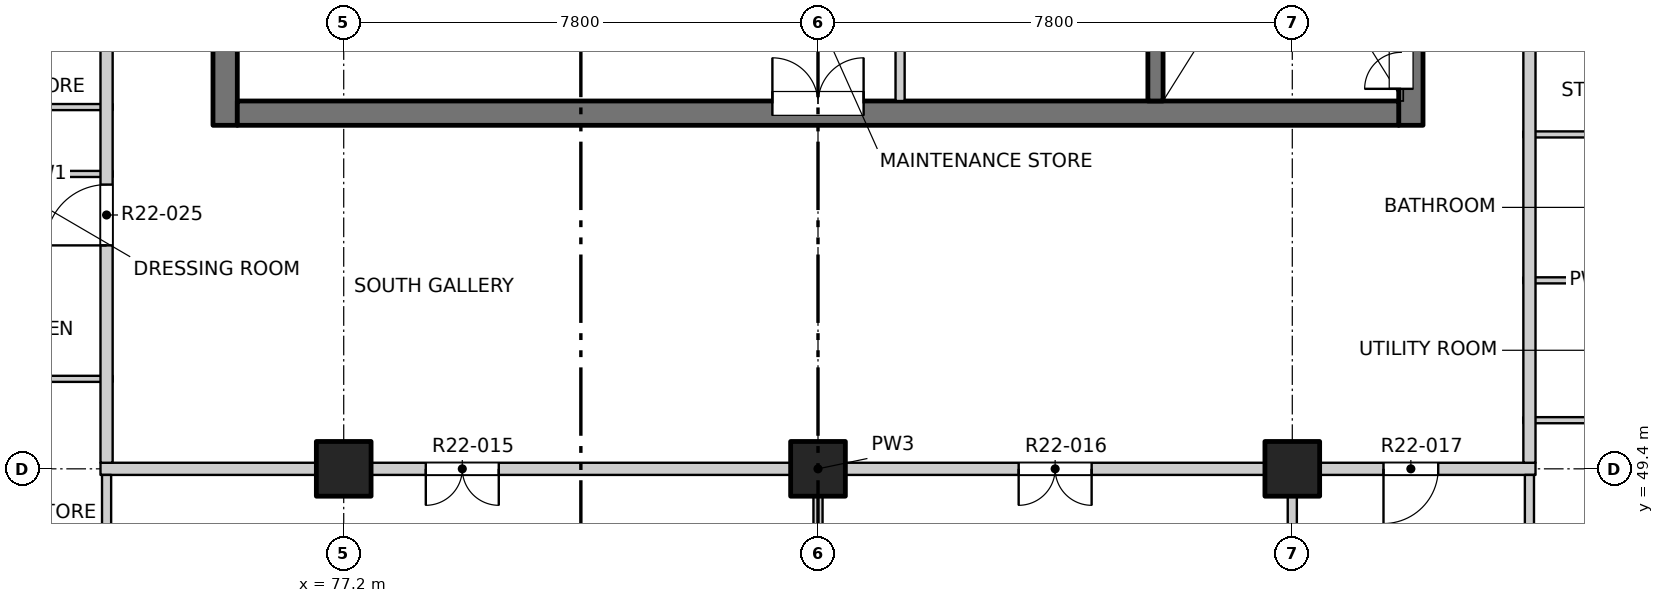
"""IFC4 building model, lengths in metres.
Left out: names, types, materials, properties, quantities, classifications, styles, units other than length and angle.
Written with IfcOpenShell. Run it as: python <this file> out.ifc"""

import sys

from ifc_helpers import new_model, si_unit, direction, frame, frame_2d, origin, origin_2d, place, context, subcontext, project, spatial, rectangle, extrude, element, fill, save


model = new_model("IFC4")
c1 = context("Model", 3, precision=1e-05, world=origin(), true_north=direction((0.0, 1.0)))
c2 = subcontext(c1, "Body", "Model", "MODEL_VIEW")
j1 = project(units=[si_unit("LENGTHUNIT", "METRE"), si_unit("PLANEANGLEUNIT", "RADIAN")], contexts=[c1])
p1 = place(None, origin())
s1 = spatial("IfcSite", under=j1, at=p1, CompositionType="ELEMENT")
p2 = place(p1, origin())
s2 = spatial("IfcBuilding", under=s1, at=p2, CompositionType="ELEMENT")
p3 = place(p2, frame((0.0, 0.0, 231.3)))
s3 = spatial("IfcBuildingStorey", under=s2, at=p3, CompositionType="ELEMENT", Elevation=231.3)
for number, where, z_axis, x_axis in (
    (1, (77.2, 49.4, -0.25), (0.0, 0.0, 1.0), (1.0, 0.0, 0.0)),
    (2, (85.0, 49.4, -0.25), (0.0, 0.0, 1.0), (1.0, 0.0, 0.0)),
    (3, (92.8, 49.4, -0.25), (0.0, 0.0, 1.0), (1.0, 0.0, 0.0)),
):
    element("IfcColumn", number, at=place(p3, frame(where, z_axis=z_axis, x_axis=x_axis)), inside=s3, PredefinedType="COLUMN", context=c2, shape_type="SweptSolid", body=[
        extrude(rectangle(XDim=0.9, YDim=0.9, at=origin_2d()), origin(), (0.0, 0.0, 1.0), 3.4),
    ])
p4 = place(p3, frame((75.25, 55.05, -0.25), z_axis=(0.0, 0.0, 1.0), x_axis=(0.0, 1.0, 0.0)))
e4 = element("IfcWall", 4, at=p4, inside=s3, PredefinedType="SOLIDWALL", context=c2, shape_type="SweptSolid", body=[
    extrude(rectangle(XDim=22.25, YDim=0.4, at=frame_2d((11.125, 0.0))), origin(), (0.0, 0.0, 1.0), 3.4),
])
p5 = place(p4, frame((7.4, 0.0, 0.25)))
e5 = element("IfcOpeningElement", 5, at=p5, cuts=e4, PredefinedType="OPENING", context=c2, shape_type="SweptSolid", body=[
    extrude(rectangle(XDim=0.9, YDim=2.1, at=frame_2d((0.45, 1.05))), frame((0.0, 0.21, 0.0), z_axis=(0.0, -1.0, 0.0), x_axis=(1.0, 0.0, 0.0)), (0.0, 0.0, 1.0), 0.42),
])
p6 = place(p4, frame((10.7, 0.0, 0.25)))
e6 = element("IfcOpeningElement", 6, at=p6, cuts=e4, PredefinedType="OPENING", context=c2, shape_type="SweptSolid", body=[
    extrude(rectangle(XDim=0.9, YDim=2.1, at=frame_2d((0.45, 1.05))), frame((0.0, 0.21, 0.0), z_axis=(0.0, -1.0, 0.0), x_axis=(1.0, 0.0, 0.0)), (0.0, 0.0, 1.0), 0.42),
])
p7 = place(p4, frame((15.2, 0.0, 0.25)))
e7 = element("IfcOpeningElement", 7, at=p7, cuts=e4, PredefinedType="OPENING", context=c2, shape_type="SweptSolid", body=[
    extrude(rectangle(XDim=0.9, YDim=2.1, at=frame_2d((0.45, 1.05))), frame((0.0, 0.21, 0.0), z_axis=(0.0, -1.0, 0.0), x_axis=(1.0, 0.0, 0.0)), (0.0, 0.0, 1.0), 0.42),
])
p8 = place(p4, frame((20.0, 0.0, 0.25)))
e8 = element("IfcOpeningElement", 8, at=p8, cuts=e4, PredefinedType="OPENING", context=c2, shape_type="SweptSolid", body=[
    extrude(rectangle(XDim=0.9, YDim=2.1, at=frame_2d((0.45, 1.05))), frame((0.0, 0.21, 0.0), z_axis=(0.0, -1.0, 0.0), x_axis=(1.0, 0.0, 0.0)), (0.0, 0.0, 1.0), 0.42),
])
p9 = place(p3, frame((94.75, 55.05, -0.25), z_axis=(0.0, 0.0, 1.0), x_axis=(0.0, 1.0, 0.0)))
e9 = element("IfcWall", 9, at=p9, inside=s3, PredefinedType="SOLIDWALL", context=c2, shape_type="SweptSolid", body=[
    extrude(rectangle(XDim=6.9, YDim=0.4, at=frame_2d((3.45, 0.0))), origin(), (0.0, 0.0, 1.0), 3.4),
])
p10 = place(p9, frame((0.6, 0.0, 0.25)))
e10 = element("IfcOpeningElement", 10, at=p10, cuts=e9, PredefinedType="OPENING", context=c2, shape_type="SweptSolid", body=[
    extrude(rectangle(XDim=1.2, YDim=2.1, at=frame_2d((0.6, 1.05))), frame((0.0, 0.21, 0.0), z_axis=(0.0, -1.0, 0.0), x_axis=(1.0, 0.0, 0.0)), (0.0, 0.0, 1.0), 0.42),
])
p11 = place(p3, frame((75.45, 55.25, -0.25), z_axis=(0.0, 0.0, 1.0), x_axis=(1.0, 0.0, 0.0)))
e11 = element("IfcWall", 11, at=p11, inside=s3, PredefinedType="SOLIDWALL", context=c2, shape_type="SweptSolid", body=[
    extrude(rectangle(XDim=19.1, YDim=0.4, at=frame_2d((9.55, 0.0))), origin(), (0.0, 0.0, 1.0), 3.4),
])
p12 = place(p11, frame((8.8, 0.0, 0.25)))
e12 = element("IfcOpeningElement", 12, at=p12, cuts=e11, PredefinedType="OPENING", context=c2, shape_type="SweptSolid", body=[
    extrude(rectangle(XDim=1.5, YDim=2.1, at=frame_2d((0.75, 1.05))), frame((0.0, 0.21, 0.0), z_axis=(0.0, -1.0, 0.0), x_axis=(1.0, 0.0, 0.0)), (0.0, 0.0, 1.0), 0.42),
])
p13 = place(p3, frame((90.55, 55.45, -0.25), z_axis=(0.0, 0.0, 1.0), x_axis=(0.0, 1.0, 0.0)))
e13 = element("IfcWall", 13, at=p13, inside=s3, PredefinedType="SOLIDWALL", context=c2, shape_type="SweptSolid", body=[
    extrude(rectangle(XDim=6.5, YDim=0.25, at=frame_2d((3.25, 0.0))), origin(), (0.0, 0.0, 1.0), 3.4),
])
p14 = place(p3, frame((73.2, 49.4, 0.0), z_axis=(0.0, 0.0, 1.0), x_axis=(1.0, 0.0, 0.0)))
e14 = element("IfcWall", 14, at=p14, inside=s3, PredefinedType="PARTITIONING", context=c2, shape_type="SweptSolid", body=[
    extrude(rectangle(XDim=23.6, YDim=0.2, at=frame_2d((11.8, 0.0))), origin(), (0.0, 0.0, 1.0), 3.15),
])
p15 = place(p14, frame((5.35, 0.0, 0.0)))
e15 = element("IfcOpeningElement", 15, at=p15, cuts=e14, PredefinedType="OPENING", context=c2, shape_type="SweptSolid", body=[
    extrude(rectangle(XDim=1.2, YDim=2.1, at=frame_2d((0.6, 1.05))), frame((0.0, 0.11, 0.0), z_axis=(0.0, -1.0, 0.0), x_axis=(1.0, 0.0, 0.0)), (0.0, 0.0, 1.0), 0.22),
])
p16 = place(p14, frame((15.1, 0.0, 0.0)))
e16 = element("IfcOpeningElement", 16, at=p16, cuts=e14, PredefinedType="OPENING", context=c2, shape_type="SweptSolid", body=[
    extrude(rectangle(XDim=1.2, YDim=2.1, at=frame_2d((0.6, 1.05))), frame((0.0, 0.11, 0.0), z_axis=(0.0, -1.0, 0.0), x_axis=(1.0, 0.0, 0.0)), (0.0, 0.0, 1.0), 0.22),
])
p17 = place(p14, frame((21.1, 0.0, 0.0)))
e17 = element("IfcOpeningElement", 17, at=p17, cuts=e14, PredefinedType="OPENING", context=c2, shape_type="SweptSolid", body=[
    extrude(rectangle(XDim=0.9, YDim=2.1, at=frame_2d((0.45, 1.05))), frame((0.0, 0.11, 0.0), z_axis=(0.0, -1.0, 0.0), x_axis=(1.0, 0.0, 0.0)), (0.0, 0.0, 1.0), 0.22),
])
for number, where, z_axis, x_axis in (
    (18, (96.6, 50.2, 0.0), (0.0, 0.0, 1.0), (1.0, 0.0, 0.0)),
    (19, (71.18, 50.88, 0.0), (0.0, 0.0, 1.0), (1.0, 0.0, 0.0)),
    (20, (96.6, 52.5, 0.0), (0.0, 0.0, 1.0), (1.0, 0.0, 0.0)),
    (21, (71.18, 54.25, 0.0), (0.0, 0.0, 1.0), (1.0, 0.0, 0.0)),
    (22, (96.6, 54.9, 0.0), (0.0, 0.0, 1.0), (1.0, 0.0, 0.0)),
    (23, (71.18, 55.35, 0.0), (0.0, 0.0, 1.0), (1.0, 0.0, 0.0)),
):
    element("IfcWall", number, at=place(p3, frame(where, z_axis=z_axis, x_axis=x_axis)), inside=s3, PredefinedType="PARTITIONING", context=c2, shape_type="SweptSolid", body=[
        extrude(rectangle(XDim=2.22, YDim=0.1, at=frame_2d((1.11, 0.0))), origin(), (0.0, 0.0, 1.0), 3.15),
    ])
p18 = place(p3, frame((73.3, 41.9, 0.0), z_axis=(0.0, 0.0, 1.0), x_axis=(0.0, 1.0, 0.0)))
e24 = element("IfcWall", 24, at=p18, inside=s3, PredefinedType="PARTITIONING", context=c2, shape_type="SweptSolid", body=[
    extrude(rectangle(XDim=7.4, YDim=0.15, at=frame_2d((3.7, 0.0))), origin(), (0.0, 0.0, 1.0), 3.15),
])
p19 = place(p3, frame((73.3, 49.5, 0.0), z_axis=(0.0, 0.0, 1.0), x_axis=(0.0, 1.0, 0.0)))
e25 = element("IfcWall", 25, at=p19, inside=s3, PredefinedType="PARTITIONING", context=c2, shape_type="SweptSolid", body=[
    extrude(rectangle(XDim=34.9, YDim=0.2, at=frame_2d((17.45, 0.0))), origin(), (0.0, 0.0, 1.0), 3.15),
])
p20 = place(p19, frame((3.575, 0.0, 0.0)))
e26 = element("IfcOpeningElement", 26, at=p20, cuts=e25, PredefinedType="OPENING", context=c2, shape_type="SweptSolid", body=[
    extrude(rectangle(XDim=1.0, YDim=2.1, at=frame_2d((0.5, 1.05))), frame((0.0, 0.11, 0.0), z_axis=(0.0, -1.0, 0.0), x_axis=(1.0, 0.0, 0.0)), (0.0, 0.0, 1.0), 0.22),
])
p21 = place(p19, frame((18.075, 0.0, 0.0)))
e27 = element("IfcOpeningElement", 27, at=p21, cuts=e25, PredefinedType="OPENING", context=c2, shape_type="SweptSolid", body=[
    extrude(rectangle(XDim=1.0, YDim=2.1, at=frame_2d((0.5, 1.05))), frame((0.0, 0.11, 0.0), z_axis=(0.0, -1.0, 0.0), x_axis=(1.0, 0.0, 0.0)), (0.0, 0.0, 1.0), 0.22),
])
p22 = place(p19, frame((26.175, 0.0, 0.0)))
e28 = element("IfcOpeningElement", 28, at=p22, cuts=e25, PredefinedType="OPENING", context=c2, shape_type="SweptSolid", body=[
    extrude(rectangle(XDim=1.0, YDim=2.1, at=frame_2d((0.5, 1.05))), frame((0.0, 0.11, 0.0), z_axis=(0.0, -1.0, 0.0), x_axis=(1.0, 0.0, 0.0)), (0.0, 0.0, 1.0), 0.22),
])
p23 = place(p3, frame((85.0, 41.9, 0.0), z_axis=(0.0, 0.0, 1.0), x_axis=(0.0, 1.0, 0.0)))
e29 = element("IfcWall", 29, at=p23, inside=s3, PredefinedType="PARTITIONING", context=c2, shape_type="SweptSolid", body=[
    extrude(rectangle(XDim=7.4, YDim=0.15, at=frame_2d((3.7, 0.0))), origin(), (0.0, 0.0, 1.0), 3.15),
])
p24 = place(p3, frame((86.35, 55.45, 0.0), z_axis=(0.0, 0.0, 1.0), x_axis=(0.0, 1.0, 0.0)))
e30 = element("IfcWall", 30, at=p24, inside=s3, PredefinedType="PARTITIONING", context=c2, shape_type="SweptSolid", body=[
    extrude(rectangle(XDim=5.575, YDim=0.15, at=frame_2d((2.788, 0.0))), origin(), (0.0, 0.0, 1.0), 3.15),
])
p25 = place(p24, frame((2.25, 0.0, 0.0)))
e31 = element("IfcOpeningElement", 31, at=p25, cuts=e30, PredefinedType="OPENING", context=c2, shape_type="SweptSolid", body=[
    extrude(rectangle(XDim=0.9, YDim=2.1, at=frame_2d((0.45, 1.05))), frame((0.0, 0.085, 0.0), z_axis=(0.0, -1.0, 0.0), x_axis=(1.0, 0.0, 0.0)), (0.0, 0.0, 1.0), 0.17),
])
for number, where, z_axis, x_axis in (
    (32, (92.8, 41.9, 0.0), (0.0, 0.0, 1.0), (0.0, 1.0, 0.0)),
    (33, (96.7, 41.9, 0.0), (0.0, 0.0, 1.0), (0.0, 1.0, 0.0)),
):
    element("IfcWall", number, at=place(p3, frame(where, z_axis=z_axis, x_axis=x_axis)), inside=s3, PredefinedType="PARTITIONING", context=c2, shape_type="SweptSolid", body=[
        extrude(rectangle(XDim=7.4, YDim=0.15, at=frame_2d((3.7, 0.0))), origin(), (0.0, 0.0, 1.0), 3.15),
    ])
p26 = place(p3, frame((96.7, 49.5, 0.0), z_axis=(0.0, 0.0, 1.0), x_axis=(0.0, 1.0, 0.0)))
e34 = element("IfcWall", 34, at=p26, inside=s3, PredefinedType="PARTITIONING", context=c2, shape_type="SweptSolid", body=[
    extrude(rectangle(XDim=34.9, YDim=0.2, at=frame_2d((17.45, 0.0))), origin(), (0.0, 0.0, 1.0), 3.15),
])
p27 = place(p26, frame((9.675, 0.0, 0.0)))
e35 = element("IfcOpeningElement", 35, at=p27, cuts=e34, PredefinedType="OPENING", context=c2, shape_type="SweptSolid", body=[
    extrude(rectangle(XDim=1.0, YDim=2.1, at=frame_2d((0.5, 1.05))), frame((0.0, 0.11, 0.0), z_axis=(0.0, -1.0, 0.0), x_axis=(1.0, 0.0, 0.0)), (0.0, 0.0, 1.0), 0.22),
])
p28 = place(p26, frame((22.925, 0.0, 0.0)))
e36 = element("IfcOpeningElement", 36, at=p28, cuts=e34, PredefinedType="OPENING", context=c2, shape_type="SweptSolid", body=[
    extrude(rectangle(XDim=1.0, YDim=2.1, at=frame_2d((0.5, 1.05))), frame((0.0, 0.11, 0.0), z_axis=(0.0, -1.0, 0.0), x_axis=(1.0, 0.0, 0.0)), (0.0, 0.0, 1.0), 0.22),
])
p29 = place(p26, frame((33.025, 0.0, 0.0)))
e37 = element("IfcOpeningElement", 37, at=p29, cuts=e34, PredefinedType="OPENING", context=c2, shape_type="SweptSolid", body=[
    extrude(rectangle(XDim=1.0, YDim=2.1, at=frame_2d((0.5, 1.05))), frame((0.0, 0.11, 0.0), z_axis=(0.0, -1.0, 0.0), x_axis=(1.0, 0.0, 0.0)), (0.0, 0.0, 1.0), 0.22),
])
p30 = place(p15, origin())
e38 = element("IfcDoor", 38, at=p30, inside=s3, OperationType="DOUBLE_DOOR_SINGLE_SWING", PredefinedType="DOOR", context=c2, shape_type="SweptSolid", body=[
    extrude(rectangle(XDim=1.2, YDim=2.1, at=frame_2d((0.6, 1.05))), frame((0.0, 0.025, 0.0), z_axis=(0.0, -1.0, 0.0), x_axis=(1.0, 0.0, 0.0)), (0.0, 0.0, 1.0), 0.05),
])
fill(e15, e38)
p31 = place(p16, origin())
e39 = element("IfcDoor", 39, at=p31, inside=s3, OperationType="DOUBLE_DOOR_SINGLE_SWING", PredefinedType="DOOR", context=c2, shape_type="SweptSolid", body=[
    extrude(rectangle(XDim=1.2, YDim=2.1, at=frame_2d((0.6, 1.05))), frame((0.0, 0.025, 0.0), z_axis=(0.0, -1.0, 0.0), x_axis=(1.0, 0.0, 0.0)), (0.0, 0.0, 1.0), 0.05),
])
fill(e16, e39)
p32 = place(p17, origin())
e40 = element("IfcDoor", 40, at=p32, inside=s3, OperationType="SINGLE_SWING_RIGHT", PredefinedType="DOOR", context=c2, shape_type="SweptSolid", body=[
    extrude(rectangle(XDim=0.9, YDim=2.1, at=frame_2d((0.45, 1.05))), frame((0.0, 0.025, 0.0), z_axis=(0.0, -1.0, 0.0), x_axis=(1.0, 0.0, 0.0)), (0.0, 0.0, 1.0), 0.05),
])
fill(e17, e40)
p33 = place(p20, origin())
e41 = element("IfcDoor", 41, at=p33, inside=s3, OperationType="SINGLE_SWING_LEFT", PredefinedType="DOOR", context=c2, shape_type="SweptSolid", body=[
    extrude(rectangle(XDim=1.0, YDim=2.1, at=frame_2d((0.5, 1.05))), frame((0.0, 0.025, 0.0), z_axis=(0.0, -1.0, 0.0), x_axis=(1.0, 0.0, 0.0)), (0.0, 0.0, 1.0), 0.05),
])
fill(e26, e41)
p34 = place(p12, origin())
e42 = element("IfcDoor", 42, at=p34, inside=s3, OperationType="DOUBLE_DOOR_SINGLE_SWING", PredefinedType="DOOR", context=c2, shape_type="SweptSolid", body=[
    extrude(rectangle(XDim=1.5, YDim=2.1, at=frame_2d((0.75, 1.05))), frame((0.0, 0.185, 0.0), z_axis=(0.0, -1.0, 0.0), x_axis=(1.0, 0.0, 0.0)), (0.0, 0.0, 1.0), 0.05),
])
fill(e12, e42)
p35 = place(p10, origin())
e43 = element("IfcDoor", 43, at=p35, inside=s3, OperationType="DOUBLE_DOOR_SINGLE_SWING", PredefinedType="DOOR", context=c2, shape_type="SweptSolid", body=[
    extrude(rectangle(XDim=1.2, YDim=2.1, at=frame_2d((0.6, 1.05))), frame((0.0, 0.185, 0.0), z_axis=(0.0, -1.0, 0.0), x_axis=(1.0, 0.0, 0.0)), (0.0, 0.0, 1.0), 0.05),
])
fill(e10, e43)
save(model, sys.argv[1])
